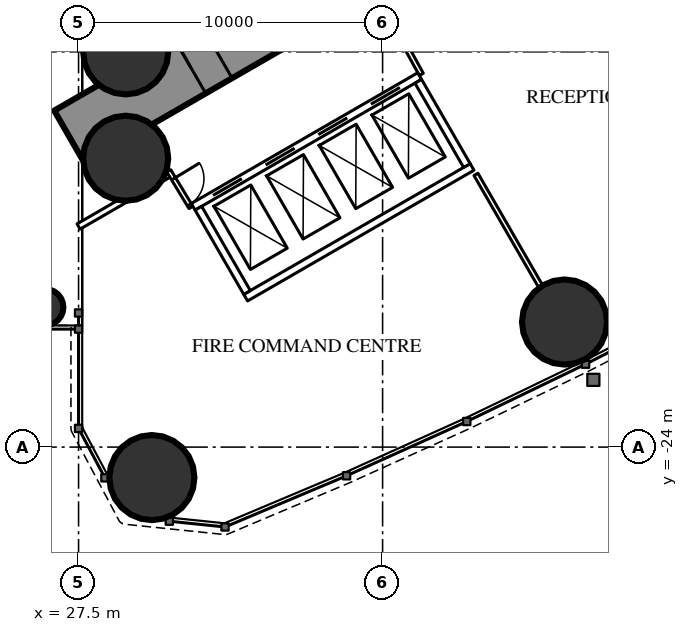
"""IFC4 building model, lengths in metres.
Left out: names, types, materials, properties, quantities, classifications, styles, units other than length and angle.
Written with IfcOpenShell. Run it as: python <this file> out.ifc"""

import sys

from ifc_helpers import new_model, si_unit, direction, frame, frame_2d, origin, origin_2d, place, context, subcontext, project, spatial, rectangle, circle, hollow_circle, extrude, element, fill, save


model = new_model("IFC4")
c1 = context("Model", 3, precision=1e-05, world=origin(), true_north=direction((0.0, 1.0)))
c2 = subcontext(c1, "Body", "Model", "MODEL_VIEW")
j1 = project(units=[si_unit("LENGTHUNIT", "METRE"), si_unit("PLANEANGLEUNIT", "RADIAN")], contexts=[c1])
p1 = place(None, origin())
s1 = spatial("IfcSite", under=j1, at=p1, CompositionType="ELEMENT")
p2 = place(p1, origin())
s2 = spatial("IfcBuilding", under=s1, at=p2, CompositionType="ELEMENT")
p3 = place(p2, origin())
s3 = spatial("IfcBuildingStorey", under=s2, at=p3, CompositionType="ELEMENT", Elevation=0.0)
for number, where, z_axis, x_axis in (
    (1, (29.911, -25.002, 0.0), (0.0, 0.0, 1.0), (1.0, 0.0, 0.0)),
    (2, (29.05, -11.0, 0.0), (0.0, 0.0, 1.0), (1.0, 0.0, 0.0)),
    (3, (29.05, -14.5, 0.0), (0.0, 0.0, 1.0), (1.0, 0.0, 0.0)),
    (4, (43.484, -19.886, 0.0), (0.0, 0.0, 1.0), (1.0, 0.0, 0.0)),
):
    element("IfcColumn", number, at=place(p3, frame(where, z_axis=z_axis, x_axis=x_axis)), inside=s3, PredefinedType="COLUMN", context=c2, shape_type="SweptSolid", body=[
        extrude(hollow_circle(Radius=1.4, WallThickness=0.12, at=origin_2d()), origin(), (0.0, 0.0, 1.0), 7.2),
    ])
p4 = place(p3, frame((27.2, -13.8, 0.0), z_axis=(0.0, 0.0, 1.0), x_axis=(0.866027159892, 0.499996958321, 0.0)))
e5 = element("IfcWall", 5, at=p4, inside=s3, PredefinedType="SHEAR", context=c2, shape_type="SweptSolid", body=[
    extrude(rectangle(XDim=27.947, YDim=2.0, at=frame_2d((13.973, 0.0))), origin(), (0.0, 0.0, 1.0), 7.2),
])
p5 = place(p4, frame((4.6, 0.0, 0.0)))
e6 = element("IfcOpeningElement", 6, at=p5, cuts=e5, PredefinedType="OPENING", context=c2, shape_type="SweptSolid", body=[
    extrude(rectangle(XDim=1.0, YDim=2.2, at=frame_2d((0.5, 1.1))), frame((0.0, 1.01, 0.0), z_axis=(0.0, -1.0, 0.0), x_axis=(1.0, 0.0, 0.0)), (0.0, 0.0, 1.0), 2.02),
])
p6 = place(p4, frame((13.395, 0.0, 0.0)))
e7 = element("IfcOpeningElement", 7, at=p6, cuts=e5, PredefinedType="OPENING", context=c2, shape_type="SweptSolid", body=[
    extrude(rectangle(XDim=1.8, YDim=2.2, at=frame_2d((0.9, 1.1))), frame((0.0, 1.01, 0.0), z_axis=(0.0, -1.0, 0.0), x_axis=(1.0, 0.0, 0.0)), (0.0, 0.0, 1.0), 2.02),
])
p7 = place(p3, frame((26.4, -19.4, 0.0), z_axis=(0.0, 0.0, 1.0), x_axis=(1.0, 0.0, 0.0)))
e8 = element("IfcColumn", 8, at=p7, inside=s3, PredefinedType="COLUMN", context=c2, shape_type="SweptSolid", body=[
    extrude(circle(Radius=0.6, at=origin_2d()), origin(), (0.0, 0.0, 1.0), 7.2),
])
p8 = place(p3, frame((40.57, -15.03, 0.0), z_axis=(0.0, 0.0, 1.0), x_axis=(0.500012993597, -0.866017901798, 0.0)))
e9 = element("IfcWall", 9, at=p8, inside=s3, PredefinedType="PARTITIONING", context=c2, shape_type="SweptSolid", body=[
    extrude(rectangle(XDim=4.243, YDim=0.15, at=frame_2d((2.122, 0.0))), origin(), (0.0, 0.0, 1.0), 6.85),
])
p9 = place(p3, frame((27.5, -16.744, 0.0), z_axis=(0.0, 0.0, 1.0), x_axis=(0.866034395887, 0.499984424899, 0.0)))
e10 = element("IfcWall", 10, at=p9, inside=s3, PredefinedType="PARTITIONING", context=c2, shape_type="SweptSolid", body=[
    extrude(rectangle(XDim=3.469, YDim=0.2, at=frame_2d((1.734, 0.0))), origin(), (0.0, 0.0, 1.0), 6.85),
])
p10 = place(p3, frame((30.467, -14.916, 0.0), z_axis=(0.0, 0.0, 1.0), x_axis=(0.518297865337, -0.855200165334, 0.0)))
e11 = element("IfcWall", 11, at=p10, inside=s3, PredefinedType="PARTITIONING", context=c2, shape_type="SweptSolid", body=[
    extrude(rectangle(XDim=1.405, YDim=0.15, at=frame_2d((0.703, 0.0))), origin(), (0.0, 0.0, 1.0), 6.85),
])
p11 = place(p10, frame((0.303, 0.0, 0.0)))
e12 = element("IfcOpeningElement", 12, at=p11, cuts=e11, PredefinedType="OPENING", context=c2, shape_type="SweptSolid", body=[
    extrude(rectangle(XDim=1.0, YDim=2.2, at=frame_2d((0.5, 1.1))), frame((0.0, 0.085, 0.0), z_axis=(0.0, -1.0, 0.0), x_axis=(1.0, 0.0, 0.0)), (0.0, 0.0, 1.0), 0.17),
])
p12 = place(p3, frame((38.773, -11.742, 0.0), z_axis=(0.0, 0.0, 1.0), x_axis=(-0.481418475768, 0.876490873421, 0.0)))
e13 = element("IfcWall", 13, at=p12, inside=s3, PredefinedType="PARTITIONING", context=c2, shape_type="SweptSolid", body=[
    extrude(rectangle(XDim=1.405, YDim=0.15, at=frame_2d((0.703, 0.0))), origin(), (0.0, 0.0, 1.0), 6.85),
])
p13 = place(p3, frame((31.271, -16.097, 0.0), z_axis=(0.0, 0.0, 1.0), x_axis=(0.86604045752, 0.499973925258, 0.0)))
e14 = element("IfcWall", 14, at=p13, inside=s3, PredefinedType="PARTITIONING", context=c2, shape_type="SweptSolid", body=[
    extrude(rectangle(XDim=8.6, YDim=0.25, at=frame_2d((4.3, 0.0))), origin(), (0.0, 0.0, 1.0), 6.85),
])
p14 = place(p13, frame((0.75, 0.0, 0.0)))
e15 = element("IfcOpeningElement", 15, at=p14, cuts=e14, PredefinedType="OPENING", context=c2, shape_type="SweptSolid", body=[
    extrude(rectangle(XDim=1.1, YDim=2.2, at=frame_2d((0.55, 1.1))), frame((0.0, 0.135, 0.0), z_axis=(0.0, -1.0, 0.0), x_axis=(1.0, 0.0, 0.0)), (0.0, 0.0, 1.0), 0.27),
])
p15 = place(p13, frame((2.75, 0.0, 0.0)))
e16 = element("IfcOpeningElement", 16, at=p15, cuts=e14, PredefinedType="OPENING", context=c2, shape_type="SweptSolid", body=[
    extrude(rectangle(XDim=1.1, YDim=2.2, at=frame_2d((0.55, 1.1))), frame((0.0, 0.135, 0.0), z_axis=(0.0, -1.0, 0.0), x_axis=(1.0, 0.0, 0.0)), (0.0, 0.0, 1.0), 0.27),
])
p16 = place(p13, frame((4.75, 0.0, 0.0)))
e17 = element("IfcOpeningElement", 17, at=p16, cuts=e14, PredefinedType="OPENING", context=c2, shape_type="SweptSolid", body=[
    extrude(rectangle(XDim=1.1, YDim=2.2, at=frame_2d((0.55, 1.1))), frame((0.0, 0.135, 0.0), z_axis=(0.0, -1.0, 0.0), x_axis=(1.0, 0.0, 0.0)), (0.0, 0.0, 1.0), 0.27),
])
p17 = place(p13, frame((6.75, 0.0, 0.0)))
e18 = element("IfcOpeningElement", 18, at=p17, cuts=e14, PredefinedType="OPENING", context=c2, shape_type="SweptSolid", body=[
    extrude(rectangle(XDim=1.1, YDim=2.2, at=frame_2d((0.55, 1.1))), frame((0.0, 0.135, 0.0), z_axis=(0.0, -1.0, 0.0), x_axis=(1.0, 0.0, 0.0)), (0.0, 0.0, 1.0), 0.27),
])
p18 = place(p3, frame((32.996, -19.086, 0.0), z_axis=(0.0, 0.0, 1.0), x_axis=(0.866028165386, 0.499995216735, 0.0)))
e19 = element("IfcWall", 19, at=p18, inside=s3, PredefinedType="PARTITIONING", context=c2, shape_type="SweptSolid", body=[
    extrude(rectangle(XDim=8.6, YDim=0.25, at=frame_2d((4.3, 0.0))), origin(), (0.0, 0.0, 1.0), 6.85),
])
for number, where, z_axis, x_axis in (
    (20, (31.441, -16.143, 0.0), (0.0, 0.0, 1.0), (0.5, -0.866, 0.0)),
    (21, (38.673, -11.968, 0.0), (0.0, 0.0, 1.0), (0.5, -0.866, 0.0)),
):
    element("IfcWall", number, at=place(p3, frame(where, z_axis=z_axis, x_axis=x_axis)), inside=s3, PredefinedType="PARTITIONING", context=c2, shape_type="SweptSolid", body=[
        extrude(rectangle(XDim=3.201, YDim=0.25, at=frame_2d((1.6, 0.0))), origin(), (0.0, 0.0, 1.0), 6.85),
    ])
p19 = place(p11, origin())
e22 = element("IfcDoor", 22, at=p19, inside=s3, OperationType="SINGLE_SWING_LEFT", PredefinedType="DOOR", context=c2, shape_type="SweptSolid", body=[
    extrude(rectangle(XDim=1.0, YDim=2.2, at=frame_2d((0.5, 1.1))), frame((0.0, 0.025, 0.0), z_axis=(0.0, -1.0, 0.0), x_axis=(1.0, 0.0, 0.0)), (0.0, 0.0, 1.0), 0.05),
])
fill(e12, e22)
p20 = place(p5, origin())
e23 = element("IfcDoor", 23, at=p20, inside=s3, OperationType="SINGLE_SWING_LEFT", PredefinedType="DOOR", context=c2, shape_type="SweptSolid", body=[
    extrude(rectangle(XDim=1.0, YDim=2.2, at=frame_2d((0.5, 1.1))), frame((0.0, 0.025, 0.0), z_axis=(0.0, -1.0, 0.0), x_axis=(1.0, 0.0, 0.0)), (0.0, 0.0, 1.0), 0.05),
])
fill(e6, e23)
p21 = place(p14, origin())
e24 = element("IfcDoor", 24, at=p21, inside=s3, OperationType="DOUBLE_DOOR_SLIDING", PredefinedType="USERDEFINED", context=c2, shape_type="SweptSolid", body=[
    extrude(rectangle(XDim=1.1, YDim=2.2, at=frame_2d((0.55, 1.1))), frame((0.0, 0.025, 0.0), z_axis=(0.0, -1.0, 0.0), x_axis=(1.0, 0.0, 0.0)), (0.0, 0.0, 1.0), 0.05),
])
fill(e15, e24)
p22 = place(p15, origin())
e25 = element("IfcDoor", 25, at=p22, inside=s3, OperationType="DOUBLE_DOOR_SLIDING", PredefinedType="USERDEFINED", context=c2, shape_type="SweptSolid", body=[
    extrude(rectangle(XDim=1.1, YDim=2.2, at=frame_2d((0.55, 1.1))), frame((0.0, 0.025, 0.0), z_axis=(0.0, -1.0, 0.0), x_axis=(1.0, 0.0, 0.0)), (0.0, 0.0, 1.0), 0.05),
])
fill(e16, e25)
p23 = place(p16, origin())
e26 = element("IfcDoor", 26, at=p23, inside=s3, OperationType="DOUBLE_DOOR_SLIDING", PredefinedType="USERDEFINED", context=c2, shape_type="SweptSolid", body=[
    extrude(rectangle(XDim=1.1, YDim=2.2, at=frame_2d((0.55, 1.1))), frame((0.0, 0.025, 0.0), z_axis=(0.0, -1.0, 0.0), x_axis=(1.0, 0.0, 0.0)), (0.0, 0.0, 1.0), 0.05),
])
fill(e17, e26)
p24 = place(p17, origin())
e27 = element("IfcDoor", 27, at=p24, inside=s3, OperationType="DOUBLE_DOOR_SLIDING", PredefinedType="USERDEFINED", context=c2, shape_type="SweptSolid", body=[
    extrude(rectangle(XDim=1.1, YDim=2.2, at=frame_2d((0.55, 1.1))), frame((0.0, 0.025, 0.0), z_axis=(0.0, -1.0, 0.0), x_axis=(1.0, 0.0, 0.0)), (0.0, 0.0, 1.0), 0.05),
])
fill(e18, e27)
save(model, sys.argv[1])
